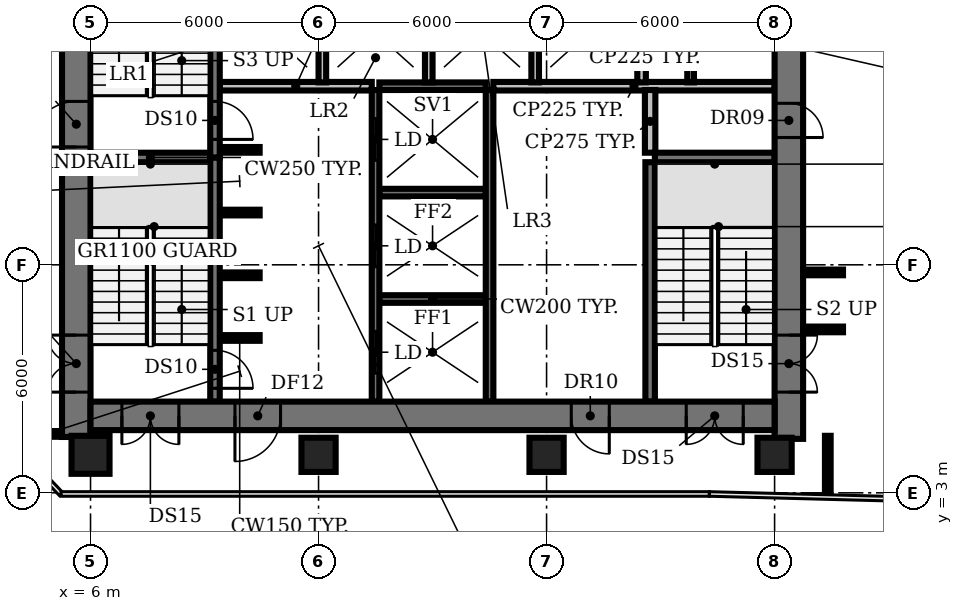
"""IFC4 building model, lengths in metres.
Left out: names, types, materials, properties, quantities, classifications, styles, units other than length and angle.
Written with IfcOpenShell. Run it as: python <this file> out.ifc"""

import sys

from ifc_helpers import new_model, si_unit, direction, frame, frame_2d, origin, origin_2d, place, context, subcontext, project, spatial, rectangle, circle, extrude, element, fill, save


model = new_model("IFC4")
c1 = context("Model", 3, precision=1e-05, world=origin(), true_north=direction((0.0, 1.0)))
c2 = subcontext(c1, "Body", "Model", "MODEL_VIEW")
j1 = project(units=[si_unit("LENGTHUNIT", "METRE"), si_unit("PLANEANGLEUNIT", "RADIAN")], contexts=[c1])
p1 = place(None, origin())
s1 = spatial("IfcSite", under=j1, at=p1, CompositionType="ELEMENT")
p2 = place(p1, origin())
s2 = spatial("IfcBuilding", under=s1, at=p2, CompositionType="ELEMENT")
p3 = place(p2, frame((0.0, 0.0, 117.2)))
s3 = spatial("IfcBuildingStorey", under=s2, at=p3, CompositionType="ELEMENT", Elevation=117.2)
p4 = place(p3, frame((6.0, 4.0, 0.0), z_axis=(0.0, 0.0, 1.0), x_axis=(1.0, 0.0, 0.0)))
e1 = element("IfcColumn", 1, at=p4, inside=s3, PredefinedType="COLUMN", context=c2, shape_type="SweptSolid", body=[
    extrude(circle(Radius=0.5, at=origin_2d()), origin(), (0.0, 0.0, 1.0), 3.85),
])
for number, where, z_axis, x_axis in (
    (2, (12.0, 4.0, 0.0), (0.0, 0.0, 1.0), (1.0, 0.0, 0.0)),
    (3, (18.0, 4.0, 0.0), (0.0, 0.0, 1.0), (1.0, 0.0, 0.0)),
    (4, (24.0, 4.0, 0.0), (0.0, 0.0, 1.0), (1.0, 0.0, 0.0)),
):
    element("IfcColumn", number, at=place(p3, frame(where, z_axis=z_axis, x_axis=x_axis)), inside=s3, PredefinedType="COLUMN", context=c2, shape_type="SweptSolid", body=[
        extrude(rectangle(XDim=0.9, YDim=0.9, at=origin_2d()), origin(), (0.0, 0.0, 1.0), 3.85),
    ])
p5 = place(p3, frame((9.4, 7.075, 0.0), z_axis=(0.0, 0.0, 1.0), x_axis=(1.0, 0.0, 0.0)))
e5 = element("IfcWall", 5, at=p5, inside=s3, PredefinedType="SHEAR", context=c2, shape_type="SweptSolid", body=[
    extrude(rectangle(XDim=1.05, YDim=0.15, at=frame_2d((0.525, 0.0))), origin(), (0.0, 0.0, 1.0), 3.85),
])
p6 = place(p3, frame((13.6, 8.1, 0.0), z_axis=(0.0, 0.0, 1.0), x_axis=(1.0, 0.0, 0.0)))
e6 = element("IfcWall", 6, at=p6, inside=s3, PredefinedType="SHEAR", context=c2, shape_type="SweptSolid", body=[
    extrude(rectangle(XDim=2.8, YDim=0.2, at=frame_2d((1.4, 0.0))), origin(), (0.0, 0.0, 1.0), 3.85),
])
for number, where, z_axis, x_axis in (
    (7, (9.4, 8.725, 0.0), (0.0, 0.0, 1.0), (1.0, 0.0, 0.0)),
    (8, (9.4, 10.375, 0.0), (0.0, 0.0, 1.0), (1.0, 0.0, 0.0)),
):
    element("IfcWall", number, at=place(p3, frame(where, z_axis=z_axis, x_axis=x_axis)), inside=s3, PredefinedType="SHEAR", context=c2, shape_type="SweptSolid", body=[
        extrude(rectangle(XDim=1.05, YDim=0.15, at=frame_2d((0.525, 0.0))), origin(), (0.0, 0.0, 1.0), 3.85),
    ])
p7 = place(p3, frame((13.6, 10.9, 0.0), z_axis=(0.0, 0.0, 1.0), x_axis=(1.0, 0.0, 0.0)))
e9 = element("IfcWall", 9, at=p7, inside=s3, PredefinedType="SHEAR", context=c2, shape_type="SweptSolid", body=[
    extrude(rectangle(XDim=2.8, YDim=0.2, at=frame_2d((1.4, 0.0))), origin(), (0.0, 0.0, 1.0), 3.85),
])
for number, where, z_axis, x_axis in (
    (10, (6.0, 11.825, 0.0), (0.0, 0.0, 1.0), (1.0, 0.0, 0.0)),
    (11, (20.85, 11.825, 0.0), (0.0, 0.0, 1.0), (1.0, 0.0, 0.0)),
):
    element("IfcWall", number, at=place(p3, frame(where, z_axis=z_axis, x_axis=x_axis)), inside=s3, PredefinedType="SHEAR", context=c2, shape_type="SweptSolid", body=[
        extrude(rectangle(XDim=3.15, YDim=0.25, at=frame_2d((1.575, 0.0))), origin(), (0.0, 0.0, 1.0), 3.85),
    ])
p8 = place(p3, frame((9.4, 12.025, 0.0), z_axis=(0.0, 0.0, 1.0), x_axis=(1.0, 0.0, 0.0)))
e12 = element("IfcWall", 12, at=p8, inside=s3, PredefinedType="SHEAR", context=c2, shape_type="SweptSolid", body=[
    extrude(rectangle(XDim=1.05, YDim=0.15, at=frame_2d((0.525, 0.0))), origin(), (0.0, 0.0, 1.0), 3.85),
])
p9 = place(p3, frame((9.4, 13.7, 0.0), z_axis=(0.0, 0.0, 1.0), x_axis=(1.0, 0.0, 0.0)))
e13 = element("IfcWall", 13, at=p9, inside=s3, PredefinedType="PARTITIONING", context=c2, shape_type="SweptSolid", body=[
    extrude(rectangle(XDim=4.0, YDim=0.225, at=frame_2d((2.0, 0.0))), origin(), (0.0, 0.0, 1.0), 3.85),
])
p10 = place(p3, frame((13.6, 13.7, 0.0), z_axis=(0.0, 0.0, 1.0), x_axis=(1.0, 0.0, 0.0)))
e14 = element("IfcWall", 14, at=p10, inside=s3, PredefinedType="SHEAR", context=c2, shape_type="SweptSolid", body=[
    extrude(rectangle(XDim=2.8, YDim=0.2, at=frame_2d((1.4, 0.0))), origin(), (0.0, 0.0, 1.0), 3.85),
])
p11 = place(p3, frame((16.6, 13.7, 0.0), z_axis=(0.0, 0.0, 1.0), x_axis=(1.0, 0.0, 0.0)))
e15 = element("IfcWall", 15, at=p11, inside=s3, PredefinedType="PARTITIONING", context=c2, shape_type="SweptSolid", body=[
    extrude(rectangle(XDim=7.4, YDim=0.225, at=frame_2d((3.7, 0.0))), origin(), (0.0, 0.0, 1.0), 3.85),
])
p12 = place(p3, frame((9.275, 11.825, 0.0), z_axis=(0.0, 0.0, 1.0), x_axis=(0.0, -1.0, 0.0)))
e16 = element("IfcWall", 16, at=p12, inside=s3, PredefinedType="SHEAR", context=c2, shape_type="SweptSolid", body=[
    extrude(rectangle(XDim=6.425, YDim=0.25, at=frame_2d((3.212, 0.0))), origin(), (0.0, 0.0, 1.0), 3.85),
])
p13 = place(p12, frame((5.075, 0.0, 0.0)))
e17 = element("IfcOpeningElement", 17, at=p13, cuts=e16, PredefinedType="OPENING", context=c2, shape_type="SweptSolid", body=[
    extrude(rectangle(XDim=1.0, YDim=2.1, at=frame_2d((0.5, 1.05))), frame((0.0, 0.135, 0.0), z_axis=(0.0, -1.0, 0.0), x_axis=(1.0, 0.0, 0.0)), (0.0, 0.0, 1.0), 0.27),
])
p14 = place(p3, frame((9.275, 18.375, 0.0), z_axis=(0.0, 0.0, 1.0), x_axis=(0.0, -1.0, 0.0)))
e18 = element("IfcWall", 18, at=p14, inside=s3, PredefinedType="SHEAR", context=c2, shape_type="SweptSolid", body=[
    extrude(rectangle(XDim=6.55, YDim=0.25, at=frame_2d((3.275, 0.0))), origin(), (0.0, 0.0, 1.0), 3.85),
])
p15 = place(p14, frame((5.075, 0.0, 0.0)))
e19 = element("IfcOpeningElement", 19, at=p15, cuts=e18, PredefinedType="OPENING", context=c2, shape_type="SweptSolid", body=[
    extrude(rectangle(XDim=1.0, YDim=2.1, at=frame_2d((0.5, 1.05))), frame((0.0, 0.135, 0.0), z_axis=(0.0, -1.0, 0.0), x_axis=(1.0, 0.0, 0.0)), (0.0, 0.0, 1.0), 0.27),
])
p16 = place(p3, frame((12.1, 13.8, 0.0), z_axis=(0.0, 0.0, 1.0), x_axis=(0.0, 1.0, 0.0)))
e20 = element("IfcWall", 20, at=p16, inside=s3, PredefinedType="SOLIDWALL", context=c2, shape_type="SweptSolid", body=[
    extrude(rectangle(XDim=2.6, YDim=0.2, at=frame_2d((1.3, 0.0))), origin(), (0.0, 0.0, 1.0), 3.85),
])
p17 = place(p3, frame((13.5, 5.4, 0.0), z_axis=(0.0, 0.0, 1.0), x_axis=(0.0, 1.0, 0.0)))
e21 = element("IfcWall", 21, at=p17, inside=s3, PredefinedType="SHEAR", context=c2, shape_type="SweptSolid", body=[
    extrude(rectangle(XDim=8.2, YDim=0.2, at=frame_2d((4.1, 0.0))), origin(), (0.0, 0.0, 1.0), 3.85),
])
p18 = place(p17, frame((0.75, 0.0, 0.0)))
e22 = element("IfcOpeningElement", 22, at=p18, cuts=e21, PredefinedType="OPENING", context=c2, shape_type="SweptSolid", body=[
    extrude(rectangle(XDim=1.1, YDim=2.1, at=frame_2d((0.55, 1.05))), frame((0.0, 0.11, 0.0), z_axis=(0.0, -1.0, 0.0), x_axis=(1.0, 0.0, 0.0)), (0.0, 0.0, 1.0), 0.22),
])
p19 = place(p17, frame((3.55, 0.0, 0.0)))
e23 = element("IfcOpeningElement", 23, at=p19, cuts=e21, PredefinedType="OPENING", context=c2, shape_type="SweptSolid", body=[
    extrude(rectangle(XDim=1.1, YDim=2.1, at=frame_2d((0.55, 1.05))), frame((0.0, 0.11, 0.0), z_axis=(0.0, -1.0, 0.0), x_axis=(1.0, 0.0, 0.0)), (0.0, 0.0, 1.0), 0.22),
])
p20 = place(p17, frame((6.35, 0.0, 0.0)))
e24 = element("IfcOpeningElement", 24, at=p20, cuts=e21, PredefinedType="OPENING", context=c2, shape_type="SweptSolid", body=[
    extrude(rectangle(XDim=1.1, YDim=2.1, at=frame_2d((0.55, 1.05))), frame((0.0, 0.11, 0.0), z_axis=(0.0, -1.0, 0.0), x_axis=(1.0, 0.0, 0.0)), (0.0, 0.0, 1.0), 0.22),
])
p21 = place(p3, frame((14.9, 13.8, 0.0), z_axis=(0.0, 0.0, 1.0), x_axis=(0.0, 1.0, 0.0)))
e25 = element("IfcWall", 25, at=p21, inside=s3, PredefinedType="SOLIDWALL", context=c2, shape_type="SweptSolid", body=[
    extrude(rectangle(XDim=2.6, YDim=0.2, at=frame_2d((1.3, 0.0))), origin(), (0.0, 0.0, 1.0), 3.85),
])
p22 = place(p3, frame((16.5, 5.4, 0.0), z_axis=(0.0, 0.0, 1.0), x_axis=(0.0, 1.0, 0.0)))
e26 = element("IfcWall", 26, at=p22, inside=s3, PredefinedType="SHEAR", context=c2, shape_type="SweptSolid", body=[
    extrude(rectangle(XDim=8.2, YDim=0.2, at=frame_2d((4.1, 0.0))), origin(), (0.0, 0.0, 1.0), 3.85),
])
p23 = place(p3, frame((17.7, 13.8, 0.0), z_axis=(0.0, 0.0, 1.0), x_axis=(0.0, 1.0, 0.0)))
e27 = element("IfcWall", 27, at=p23, inside=s3, PredefinedType="SOLIDWALL", context=c2, shape_type="SweptSolid", body=[
    extrude(rectangle(XDim=2.6, YDim=0.2, at=frame_2d((1.3, 0.0))), origin(), (0.0, 0.0, 1.0), 3.85),
])
p24 = place(p3, frame((20.5, 13.8, 0.0), z_axis=(0.0, 0.0, 1.0), x_axis=(0.0, 1.0, 0.0)))
e28 = element("IfcWall", 28, at=p24, inside=s3, PredefinedType="PARTITIONING", context=c2, shape_type="SweptSolid", body=[
    extrude(rectangle(XDim=2.6, YDim=0.225, at=frame_2d((1.3, 0.0))), origin(), (0.0, 0.0, 1.0), 3.85),
])
p25 = place(p3, frame((20.725, 5.4, 0.0), z_axis=(0.0, 0.0, 1.0), x_axis=(0.0, 1.0, 0.0)))
e29 = element("IfcWall", 29, at=p25, inside=s3, PredefinedType="SHEAR", context=c2, shape_type="SweptSolid", body=[
    extrude(rectangle(XDim=6.3, YDim=0.25, at=frame_2d((3.15, 0.0))), origin(), (0.0, 0.0, 1.0), 3.85),
])
p26 = place(p3, frame((20.725, 11.95, 0.0), z_axis=(0.0, 0.0, 1.0), x_axis=(0.0, 1.0, 0.0)))
e30 = element("IfcWall", 30, at=p26, inside=s3, PredefinedType="PARTITIONING", context=c2, shape_type="SweptSolid", body=[
    extrude(rectangle(XDim=1.65, YDim=0.275, at=frame_2d((0.825, 0.0))), origin(), (0.0, 0.0, 1.0), 3.85),
])
p27 = place(p3, frame((21.79, 13.8, 0.0), z_axis=(0.0, 0.0, 1.0), x_axis=(0.0, 1.0, 0.0)))
e31 = element("IfcWall", 31, at=p27, inside=s3, PredefinedType="PARTITIONING", context=c2, shape_type="SweptSolid", body=[
    extrude(rectangle(XDim=2.6, YDim=0.175, at=frame_2d((1.3, 0.0))), origin(), (0.0, 0.0, 1.0), 3.85),
])
p28 = place(p3, frame((5.625, 4.47, 0.0), z_axis=(0.0, 0.0, 1.0), x_axis=(0.0, 1.0, 0.0)))
e32 = element("IfcWall", 32, at=p28, inside=s3, PredefinedType="SHEAR", context=c2, shape_type="SweptSolid", body=[
    extrude(rectangle(XDim=21.08, YDim=0.75, at=frame_2d((10.54, 0.0))), origin(), (0.0, 0.0, 1.0), 3.85),
])
p29 = place(p28, frame((1.18, 0.0, 0.0)))
e33 = element("IfcOpeningElement", 33, at=p29, cuts=e32, PredefinedType="OPENING", context=c2, shape_type="SweptSolid", body=[
    extrude(rectangle(XDim=1.5, YDim=2.1, at=frame_2d((0.75, 1.05))), frame((0.0, 0.385, 0.0), z_axis=(0.0, -1.0, 0.0), x_axis=(1.0, 0.0, 0.0)), (0.0, 0.0, 1.0), 0.77),
])
p30 = place(p28, frame((7.63, 0.0, 0.0)))
e34 = element("IfcOpeningElement", 34, at=p30, cuts=e32, PredefinedType="OPENING", context=c2, shape_type="SweptSolid", body=[
    extrude(rectangle(XDim=1.2, YDim=2.1, at=frame_2d((0.6, 1.05))), frame((0.0, 0.385, 0.0), z_axis=(0.0, -1.0, 0.0), x_axis=(1.0, 0.0, 0.0)), (0.0, 0.0, 1.0), 0.77),
])
p31 = place(p28, frame((14.18, 0.0, 0.0)))
e35 = element("IfcOpeningElement", 35, at=p31, cuts=e32, PredefinedType="OPENING", context=c2, shape_type="SweptSolid", body=[
    extrude(rectangle(XDim=1.2, YDim=2.1, at=frame_2d((0.6, 1.05))), frame((0.0, 0.385, 0.0), z_axis=(0.0, -1.0, 0.0), x_axis=(1.0, 0.0, 0.0)), (0.0, 0.0, 1.0), 0.77),
])
p32 = place(p3, frame((24.375, 25.55, 0.0), z_axis=(0.0, 0.0, 1.0), x_axis=(0.0, -1.0, 0.0)))
e36 = element("IfcWall", 36, at=p32, inside=s3, PredefinedType="SHEAR", context=c2, shape_type="SweptSolid", body=[
    extrude(rectangle(XDim=21.13, YDim=0.75, at=frame_2d((10.565, 0.0))), origin(), (0.0, 0.0, 1.0), 3.85),
])
p33 = place(p32, frame((18.4, 0.0, 0.0)))
e37 = element("IfcOpeningElement", 37, at=p33, cuts=e36, PredefinedType="OPENING", context=c2, shape_type="SweptSolid", body=[
    extrude(rectangle(XDim=1.5, YDim=2.1, at=frame_2d((0.75, 1.05))), frame((0.0, 0.385, 0.0), z_axis=(0.0, -1.0, 0.0), x_axis=(1.0, 0.0, 0.0)), (0.0, 0.0, 1.0), 0.77),
])
p34 = place(p32, frame((12.3, 0.0, 0.0)))
e38 = element("IfcOpeningElement", 38, at=p34, cuts=e36, PredefinedType="OPENING", context=c2, shape_type="SweptSolid", body=[
    extrude(rectangle(XDim=0.9, YDim=2.1, at=frame_2d((0.45, 1.05))), frame((0.0, 0.385, 0.0), z_axis=(0.0, -1.0, 0.0), x_axis=(1.0, 0.0, 0.0)), (0.0, 0.0, 1.0), 0.77),
])
p35 = place(p32, frame((6.3, 0.0, 0.0)))
e39 = element("IfcOpeningElement", 39, at=p35, cuts=e36, PredefinedType="OPENING", context=c2, shape_type="SweptSolid", body=[
    extrude(rectangle(XDim=2.0, YDim=2.1, at=frame_2d((1.0, 1.05))), frame((0.0, 0.385, 0.0), z_axis=(0.0, -1.0, 0.0), x_axis=(1.0, 0.0, 0.0)), (0.0, 0.0, 1.0), 0.77),
])
p36 = place(p3, frame((24.0, 5.025, 0.0), z_axis=(0.0, 0.0, 1.0), x_axis=(-1.0, 0.0, 0.0)))
e40 = element("IfcWall", 40, at=p36, inside=s3, PredefinedType="SHEAR", context=c2, shape_type="SweptSolid", body=[
    extrude(rectangle(XDim=18.0, YDim=0.75, at=frame_2d((9.0, 0.0))), origin(), (0.0, 0.0, 1.0), 3.85),
])
p37 = place(p36, frame((0.825, 0.0, 0.0)))
e41 = element("IfcOpeningElement", 41, at=p37, cuts=e40, PredefinedType="OPENING", context=c2, shape_type="SweptSolid", body=[
    extrude(rectangle(XDim=1.5, YDim=2.1, at=frame_2d((0.75, 1.05))), frame((0.0, 0.385, 0.0), z_axis=(0.0, -1.0, 0.0), x_axis=(1.0, 0.0, 0.0)), (0.0, 0.0, 1.0), 0.77),
])
p38 = place(p36, frame((15.675, 0.0, 0.0)))
e42 = element("IfcOpeningElement", 42, at=p38, cuts=e40, PredefinedType="OPENING", context=c2, shape_type="SweptSolid", body=[
    extrude(rectangle(XDim=1.5, YDim=2.1, at=frame_2d((0.75, 1.05))), frame((0.0, 0.385, 0.0), z_axis=(0.0, -1.0, 0.0), x_axis=(1.0, 0.0, 0.0)), (0.0, 0.0, 1.0), 0.77),
])
p39 = place(p36, frame((13.0, 0.0, 0.0)))
e43 = element("IfcOpeningElement", 43, at=p39, cuts=e40, PredefinedType="OPENING", context=c2, shape_type="SweptSolid", body=[
    extrude(rectangle(XDim=1.2, YDim=2.1, at=frame_2d((0.6, 1.05))), frame((0.0, 0.385, 0.0), z_axis=(0.0, -1.0, 0.0), x_axis=(1.0, 0.0, 0.0)), (0.0, 0.0, 1.0), 0.77),
])
p40 = place(p36, frame((4.35, 0.0, 0.0)))
e44 = element("IfcOpeningElement", 44, at=p40, cuts=e40, PredefinedType="OPENING", context=c2, shape_type="SweptSolid", body=[
    extrude(rectangle(XDim=1.0, YDim=2.1, at=frame_2d((0.5, 1.05))), frame((0.0, 0.385, 0.0), z_axis=(0.0, -1.0, 0.0), x_axis=(1.0, 0.0, 0.0)), (0.0, 0.0, 1.0), 0.77),
])
p41 = place(p3, frame((3.79, 4.55, 0.0), z_axis=(0.0, 0.0, 1.0), x_axis=(1.0, 0.0, 0.0)))
e45 = element("IfcWall", 45, at=p41, inside=s3, PredefinedType="PARTITIONING", context=c2, shape_type="SweptSolid", body=[
    extrude(rectangle(XDim=1.36, YDim=0.15, at=frame_2d((0.68, 0.0))), origin(), (0.0, 0.0, 1.0), 2.83),
])
for number, where, z_axis, x_axis in (
    (46, (24.75, 7.3, 0.0), (0.0, 0.0, 1.0), (1.0, 0.0, 0.0)),
    (47, (24.75, 8.8, 0.0), (0.0, 0.0, 1.0), (1.0, 0.0, 0.0)),
):
    element("IfcWall", number, at=place(p3, frame(where, z_axis=z_axis, x_axis=x_axis)), inside=s3, PredefinedType="PARTITIONING", context=c2, shape_type="SweptSolid", body=[
        extrude(rectangle(XDim=1.05, YDim=0.15, at=frame_2d((0.525, 0.0))), origin(), (0.0, 0.0, 1.0), 2.83),
    ])
p42 = place(p3, frame((25.4, 2.94, 0.0), z_axis=(0.0, 0.0, 1.0), x_axis=(0.0, 1.0, 0.0)))
e48 = element("IfcWall", 48, at=p42, inside=s3, PredefinedType="PARTITIONING", context=c2, shape_type="SweptSolid", body=[
    extrude(rectangle(XDim=1.56, YDim=0.15, at=frame_2d((0.78, 0.0))), origin(), (0.0, 0.0, 1.0), 2.83),
])
p43 = place(p13, origin())
e49 = element("IfcDoor", 49, at=p43, inside=s3, OperationType="SINGLE_SWING_RIGHT", PredefinedType="DOOR", context=c2, shape_type="SweptSolid", body=[
    extrude(rectangle(XDim=1.0, YDim=2.1, at=frame_2d((0.5, 1.05))), frame((0.0, 0.025, 0.0), z_axis=(0.0, -1.0, 0.0), x_axis=(1.0, 0.0, 0.0)), (0.0, 0.0, 1.0), 0.05),
])
fill(e17, e49)
p44 = place(p15, origin())
e50 = element("IfcDoor", 50, at=p44, inside=s3, OperationType="SINGLE_SWING_RIGHT", PredefinedType="DOOR", context=c2, shape_type="SweptSolid", body=[
    extrude(rectangle(XDim=1.0, YDim=2.1, at=frame_2d((0.5, 1.05))), frame((0.0, 0.025, 0.0), z_axis=(0.0, -1.0, 0.0), x_axis=(1.0, 0.0, 0.0)), (0.0, 0.0, 1.0), 0.05),
])
fill(e19, e50)
p45 = place(p18, origin())
e51 = element("IfcDoor", 51, at=p45, inside=s3, OperationType="DOUBLE_DOOR_SLIDING", PredefinedType="DOOR", context=c2, shape_type="SweptSolid", body=[
    extrude(rectangle(XDim=1.1, YDim=2.1, at=frame_2d((0.55, 1.05))), frame((0.0, 0.025, 0.0), z_axis=(0.0, -1.0, 0.0), x_axis=(1.0, 0.0, 0.0)), (0.0, 0.0, 1.0), 0.05),
])
fill(e22, e51)
p46 = place(p19, origin())
e52 = element("IfcDoor", 52, at=p46, inside=s3, OperationType="DOUBLE_DOOR_SLIDING", PredefinedType="DOOR", context=c2, shape_type="SweptSolid", body=[
    extrude(rectangle(XDim=1.1, YDim=2.1, at=frame_2d((0.55, 1.05))), frame((0.0, 0.025, 0.0), z_axis=(0.0, -1.0, 0.0), x_axis=(1.0, 0.0, 0.0)), (0.0, 0.0, 1.0), 0.05),
])
fill(e23, e52)
p47 = place(p20, origin())
e53 = element("IfcDoor", 53, at=p47, inside=s3, OperationType="DOUBLE_DOOR_SLIDING", PredefinedType="DOOR", context=c2, shape_type="SweptSolid", body=[
    extrude(rectangle(XDim=1.1, YDim=2.1, at=frame_2d((0.55, 1.05))), frame((0.0, 0.025, 0.0), z_axis=(0.0, -1.0, 0.0), x_axis=(1.0, 0.0, 0.0)), (0.0, 0.0, 1.0), 0.05),
])
fill(e24, e53)
p48 = place(p29, origin())
e54 = element("IfcDoor", 54, at=p48, inside=s3, OperationType="DOUBLE_DOOR_SINGLE_SWING", PredefinedType="DOOR", context=c2, shape_type="SweptSolid", body=[
    extrude(rectangle(XDim=1.5, YDim=2.1, at=frame_2d((0.75, 1.05))), frame((0.0, 0.025, 0.0), z_axis=(0.0, -1.0, 0.0), x_axis=(1.0, 0.0, 0.0)), (0.0, 0.0, 1.0), 0.05),
])
fill(e33, e54)
p49 = place(p30, origin())
e55 = element("IfcDoor", 55, at=p49, inside=s3, OperationType="SINGLE_SWING_LEFT", PredefinedType="DOOR", context=c2, shape_type="SweptSolid", body=[
    extrude(rectangle(XDim=1.2, YDim=2.1, at=frame_2d((0.6, 1.05))), frame((0.0, 0.025, 0.0), z_axis=(0.0, -1.0, 0.0), x_axis=(1.0, 0.0, 0.0)), (0.0, 0.0, 1.0), 0.05),
])
fill(e34, e55)
p50 = place(p33, origin())
e56 = element("IfcDoor", 56, at=p50, inside=s3, OperationType="DOUBLE_DOOR_SINGLE_SWING", PredefinedType="DOOR", context=c2, shape_type="SweptSolid", body=[
    extrude(rectangle(XDim=1.5, YDim=2.1, at=frame_2d((0.75, 1.05))), frame((0.0, 0.025, 0.0), z_axis=(0.0, -1.0, 0.0), x_axis=(1.0, 0.0, 0.0)), (0.0, 0.0, 1.0), 0.05),
])
fill(e37, e56)
p51 = place(p34, origin())
e57 = element("IfcDoor", 57, at=p51, inside=s3, OperationType="SINGLE_SWING_RIGHT", PredefinedType="DOOR", context=c2, shape_type="SweptSolid", body=[
    extrude(rectangle(XDim=0.9, YDim=2.1, at=frame_2d((0.45, 1.05))), frame((0.0, -0.315, 0.0), z_axis=(0.0, -1.0, 0.0), x_axis=(1.0, 0.0, 0.0)), (0.0, 0.0, 1.0), 0.05),
])
fill(e38, e57)
p52 = place(p37, origin())
e58 = element("IfcDoor", 58, at=p52, inside=s3, OperationType="DOUBLE_DOOR_SINGLE_SWING", PredefinedType="DOOR", context=c2, shape_type="SweptSolid", body=[
    extrude(rectangle(XDim=1.5, YDim=2.1, at=frame_2d((0.75, 1.05))), frame((0.0, 0.025, 0.0), z_axis=(0.0, -1.0, 0.0), x_axis=(1.0, 0.0, 0.0)), (0.0, 0.0, 1.0), 0.05),
])
fill(e41, e58)
p53 = place(p38, origin())
e59 = element("IfcDoor", 59, at=p53, inside=s3, OperationType="DOUBLE_DOOR_SINGLE_SWING", PredefinedType="DOOR", context=c2, shape_type="SweptSolid", body=[
    extrude(rectangle(XDim=1.5, YDim=2.1, at=frame_2d((0.75, 1.05))), frame((0.0, 0.025, 0.0), z_axis=(0.0, -1.0, 0.0), x_axis=(1.0, 0.0, 0.0)), (0.0, 0.0, 1.0), 0.05),
])
fill(e42, e59)
p54 = place(p39, origin())
e60 = element("IfcDoor", 60, at=p54, inside=s3, OperationType="SINGLE_SWING_RIGHT", PredefinedType="DOOR", context=c2, shape_type="SweptSolid", body=[
    extrude(rectangle(XDim=1.2, YDim=2.1, at=frame_2d((0.6, 1.05))), frame((0.0, 0.025, 0.0), z_axis=(0.0, -1.0, 0.0), x_axis=(1.0, 0.0, 0.0)), (0.0, 0.0, 1.0), 0.05),
])
fill(e43, e60)
p55 = place(p40, origin())
e61 = element("IfcDoor", 61, at=p55, inside=s3, OperationType="SINGLE_SWING_LEFT", PredefinedType="DOOR", context=c2, shape_type="SweptSolid", body=[
    extrude(rectangle(XDim=1.0, YDim=2.1, at=frame_2d((0.5, 1.05))), frame((0.0, -0.315, 0.0), z_axis=(0.0, -1.0, 0.0), x_axis=(1.0, 0.0, 0.0)), (0.0, 0.0, 1.0), 0.05),
])
fill(e44, e61)
save(model, sys.argv[1])
